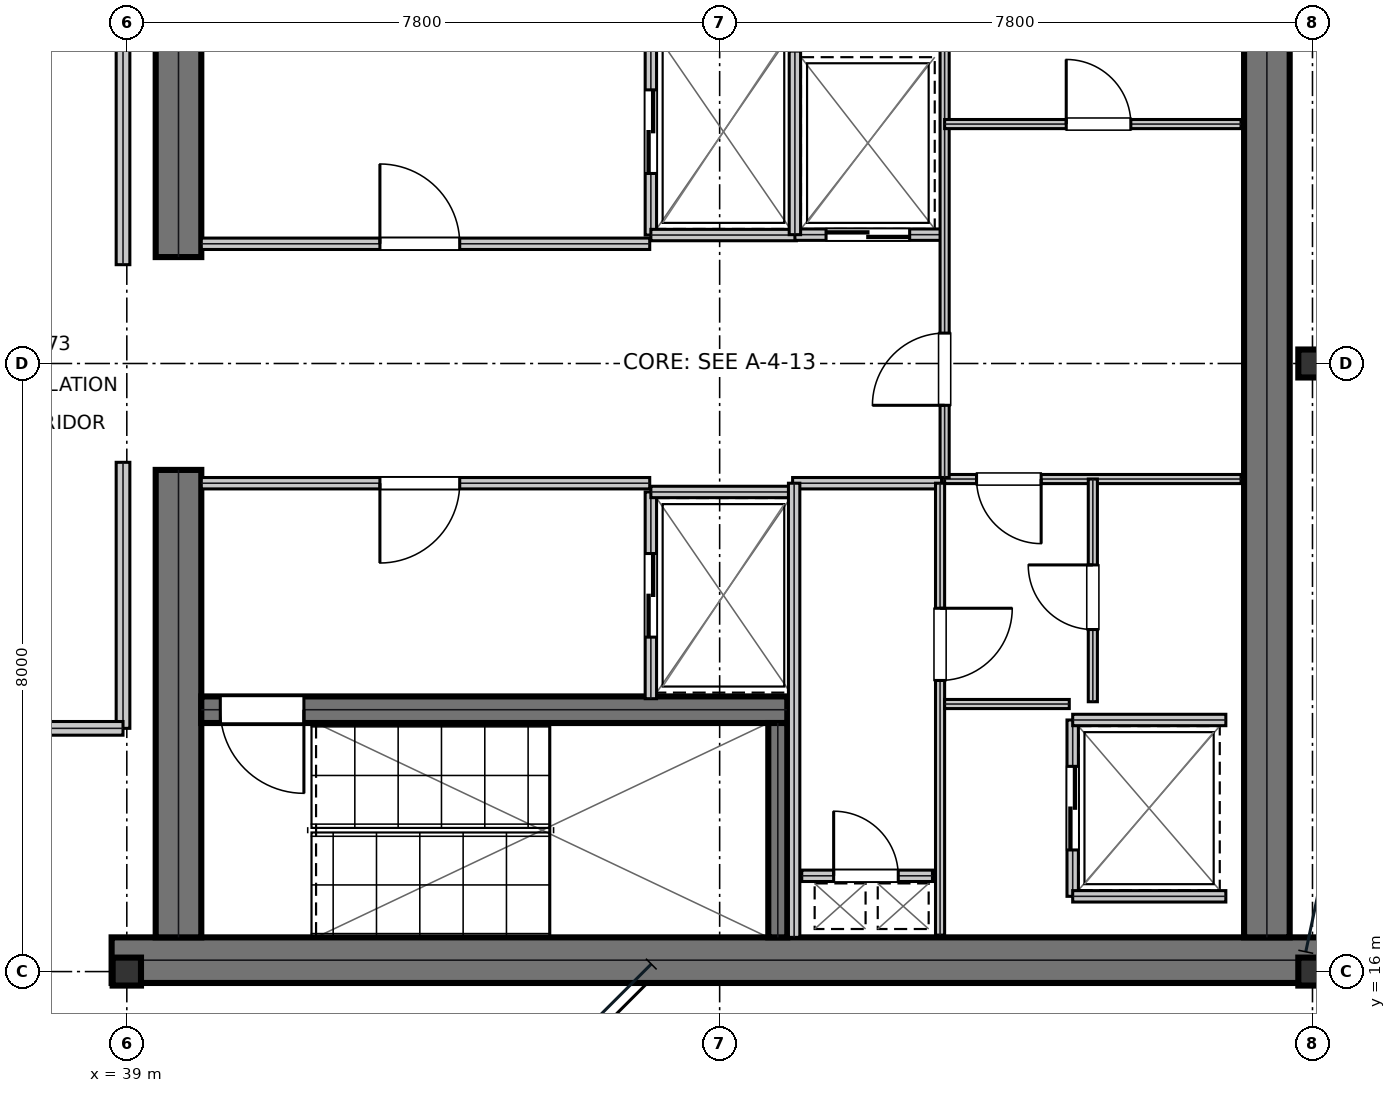
"""IFC4 building model, lengths in metres.
Left out: names, types, materials, properties, quantities, classifications, styles, units other than length and angle.
Written with IfcOpenShell. Run it as: python <this file> out.ifc"""

import sys

from ifc_helpers import new_model, si_unit, direction, frame, frame_2d, origin, origin_2d, place, context, subcontext, project, spatial, rectangle, i_section, extrude, element, fill, save


model = new_model("IFC4")
c1 = context("Model", 3, precision=1e-05, world=origin(), true_north=direction((0.0, 1.0)))
c2 = subcontext(c1, "Body", "Model", "MODEL_VIEW")
j1 = project(units=[si_unit("LENGTHUNIT", "METRE"), si_unit("PLANEANGLEUNIT", "RADIAN")], contexts=[c1])
p1 = place(None, origin())
s1 = spatial("IfcSite", under=j1, at=p1, CompositionType="ELEMENT")
p2 = place(p1, origin())
s2 = spatial("IfcBuilding", under=s1, at=p2, CompositionType="ELEMENT")
p3 = place(p2, frame((0.0, 0.0, 311.4)))
s3 = spatial("IfcBuildingStorey", under=s2, at=p3, CompositionType="ELEMENT", Elevation=311.4)
p4 = place(p3, frame((38.8, 16.15, 0.0), z_axis=(0.0, 0.0, 1.0), x_axis=(1.0, 0.0, 0.0)))
e1 = element("IfcWall", 1, at=p4, inside=s3, PredefinedType="SHEAR", context=c2, shape_type="SweptSolid", body=[
    extrude(rectangle(XDim=16.0, YDim=0.6, at=frame_2d((8.0, 0.0))), origin(), (0.0, 0.0, 1.0), 3.78),
])
for number, where, z_axis, x_axis in (
    (2, (39.68, 16.45, 0.0), (0.0, 0.0, 1.0), (0.0, 1.0, 0.0)),
    (3, (39.68, 25.4, 0.0), (0.0, 0.0, 1.0), (0.0, 1.0, 0.0)),
):
    element("IfcWall", number, at=place(p3, frame(where, z_axis=z_axis, x_axis=x_axis)), inside=s3, PredefinedType="SHEAR", context=c2, shape_type="SweptSolid", body=[
        extrude(rectangle(XDim=6.15, YDim=0.6, at=frame_2d((3.075, 0.0))), origin(), (0.0, 0.0, 1.0), 3.78),
    ])
p5 = place(p3, frame((54.0, 16.45, 0.0), z_axis=(0.0, 0.0, 1.0), x_axis=(0.0, 1.0, 0.0)))
e4 = element("IfcWall", 4, at=p5, inside=s3, PredefinedType="SHEAR", context=c2, shape_type="SweptSolid", body=[
    extrude(rectangle(XDim=15.1, YDim=0.6, at=frame_2d((7.55, 0.0))), origin(), (0.0, 0.0, 1.0), 3.78),
])
p6 = place(p3, frame((39.98, 19.445, 0.0), z_axis=(0.0, 0.0, 1.0), x_axis=(1.0, 0.0, 0.0)))
e5 = element("IfcWall", 5, at=p6, inside=s3, PredefinedType="SHEAR", context=c2, shape_type="SweptSolid", body=[
    extrude(rectangle(XDim=7.71, YDim=0.35, at=frame_2d((3.855, 0.0))), origin(), (0.0, 0.0, 1.0), 3.78),
])
p7 = place(p6, frame((0.25, 0.0, 0.0)))
e6 = element("IfcOpeningElement", 6, at=p7, cuts=e5, PredefinedType="OPENING", context=c2, shape_type="SweptSolid", body=[
    extrude(rectangle(XDim=1.1, YDim=2.15, at=frame_2d((0.55, 1.075))), frame((0.0, 0.185, 0.0), z_axis=(0.0, -1.0, 0.0), x_axis=(1.0, 0.0, 0.0)), (0.0, 0.0, 1.0), 0.37),
])
p8 = place(p3, frame((47.565, 16.45, 0.0), z_axis=(0.0, 0.0, 1.0), x_axis=(0.0, 1.0, 0.0)))
e7 = element("IfcWall", 7, at=p8, inside=s3, PredefinedType="SHEAR", context=c2, shape_type="SweptSolid", body=[
    extrude(rectangle(XDim=2.82, YDim=0.25, at=frame_2d((1.41, 0.0))), origin(), (0.0, 0.0, 1.0), 3.78),
])
for number, where, z_axis, x_axis in (
    (8, (39.0, 16.0, 0.0), (0.0, 0.0, 1.0), (1.0, 0.0, 0.0)),
    (9, (54.6, 16.0, 0.0), (0.0, 0.0, 1.0), (1.0, 0.0, 0.0)),
    (10, (54.6, 24.0, 0.0), (0.0, 0.0, 1.0), (1.0, 0.0, 0.0)),
):
    element("IfcColumn", number, at=place(p3, frame(where, z_axis=z_axis, x_axis=x_axis)), inside=s3, PredefinedType="COLUMN", context=c2, shape_type="SweptSolid", body=[
        extrude(i_section(OverallWidth=0.373, OverallDepth=0.368, WebThickness=0.015, FlangeThickness=0.024, at=origin_2d()), origin(), (0.0, 0.0, 1.0), 4.044),
    ])
p9 = place(p3, frame((39.98, 25.575, 0.0), z_axis=(0.0, 0.0, 1.0), x_axis=(1.0, 0.0, 0.0)))
e11 = element("IfcWall", 11, at=p9, inside=s3, PredefinedType="PARTITIONING", context=c2, shape_type="SweptSolid", body=[
    extrude(rectangle(XDim=5.9, YDim=0.15, at=frame_2d((2.95, 0.0))), origin(), (0.0, 0.0, 1.0), 3.78),
])
p10 = place(p9, frame((2.35, 0.0, 0.0)))
e12 = element("IfcOpeningElement", 12, at=p10, cuts=e11, PredefinedType="OPENING", context=c2, shape_type="SweptSolid", body=[
    extrude(rectangle(XDim=1.05, YDim=2.15, at=frame_2d((0.525, 1.075))), frame((0.0, 0.085, 0.0), z_axis=(0.0, -1.0, 0.0), x_axis=(1.0, 0.0, 0.0)), (0.0, 0.0, 1.0), 0.17),
])
p11 = place(p3, frame((39.98, 22.425, 0.0), z_axis=(0.0, 0.0, 1.0), x_axis=(1.0, 0.0, 0.0)))
e13 = element("IfcWall", 13, at=p11, inside=s3, PredefinedType="PARTITIONING", context=c2, shape_type="SweptSolid", body=[
    extrude(rectangle(XDim=5.9, YDim=0.15, at=frame_2d((2.95, 0.0))), origin(), (0.0, 0.0, 1.0), 3.78),
])
p12 = place(p11, frame((2.35, 0.0, 0.0)))
e14 = element("IfcOpeningElement", 14, at=p12, cuts=e13, PredefinedType="OPENING", context=c2, shape_type="SweptSolid", body=[
    extrude(rectangle(XDim=1.05, YDim=2.15, at=frame_2d((0.525, 1.075))), frame((0.0, 0.085, 0.0), z_axis=(0.0, -1.0, 0.0), x_axis=(1.0, 0.0, 0.0)), (0.0, 0.0, 1.0), 0.17),
])
p13 = place(p3, frame((45.895, 25.69, 0.0), z_axis=(0.0, 0.0, 1.0), x_axis=(0.0, 1.0, 0.0)))
e15 = element("IfcWall", 15, at=p13, inside=s3, PredefinedType="PARTITIONING", context=c2, shape_type="SweptSolid", body=[
    extrude(rectangle(XDim=2.72, YDim=0.15, at=frame_2d((1.36, 0.0))), origin(), (0.0, 0.0, 1.0), 3.78),
])
p14 = place(p13, frame((0.81, 0.0, 0.0)))
e16 = element("IfcOpeningElement", 16, at=p14, cuts=e15, PredefinedType="OPENING", context=c2, shape_type="SweptSolid", body=[
    extrude(rectangle(XDim=1.1, YDim=2.15, at=frame_2d((0.55, 1.075))), frame((0.0, 0.085, 0.0), z_axis=(0.0, -1.0, 0.0), x_axis=(1.0, 0.0, 0.0)), (0.0, 0.0, 1.0), 0.17),
])
p15 = place(p3, frame((45.895, 25.69, 0.0), z_axis=(0.0, 0.0, 1.0), x_axis=(1.0, 0.0, 0.0)))
e17 = element("IfcWall", 17, at=p15, inside=s3, PredefinedType="PARTITIONING", context=c2, shape_type="SweptSolid", body=[
    extrude(rectangle(XDim=1.915, YDim=0.15, at=frame_2d((0.958, 0.0))), origin(), (0.0, 0.0, 1.0), 3.78),
])
p16 = place(p3, frame((45.895, 19.59, 0.0), z_axis=(0.0, 0.0, 1.0), x_axis=(0.0, 1.0, 0.0)))
e18 = element("IfcWall", 18, at=p16, inside=s3, PredefinedType="PARTITIONING", context=c2, shape_type="SweptSolid", body=[
    extrude(rectangle(XDim=2.72, YDim=0.15, at=frame_2d((1.36, 0.0))), origin(), (0.0, 0.0, 1.0), 3.78),
])
p17 = place(p16, frame((0.81, 0.0, 0.0)))
e19 = element("IfcOpeningElement", 19, at=p17, cuts=e18, PredefinedType="OPENING", context=c2, shape_type="SweptSolid", body=[
    extrude(rectangle(XDim=1.1, YDim=2.15, at=frame_2d((0.55, 1.075))), frame((0.0, 0.085, 0.0), z_axis=(0.0, -1.0, 0.0), x_axis=(1.0, 0.0, 0.0)), (0.0, 0.0, 1.0), 0.17),
])
p18 = place(p3, frame((45.895, 22.31, 0.0), z_axis=(0.0, 0.0, 1.0), x_axis=(1.0, 0.0, 0.0)))
e20 = element("IfcWall", 20, at=p18, inside=s3, PredefinedType="PARTITIONING", context=c2, shape_type="SweptSolid", body=[
    extrude(rectangle(XDim=1.915, YDim=0.15, at=frame_2d((0.958, 0.0))), origin(), (0.0, 0.0, 1.0), 3.78),
])
p19 = place(p3, frame((47.79, 25.695, 0.0), z_axis=(0.0, 0.0, 1.0), x_axis=(1.0, 0.0, 0.0)))
e21 = element("IfcWall", 21, at=p19, inside=s3, PredefinedType="PARTITIONING", context=c2, shape_type="SweptSolid", body=[
    extrude(rectangle(XDim=1.92, YDim=0.15, at=frame_2d((0.96, 0.0))), origin(), (0.0, 0.0, 1.0), 3.78),
])
p20 = place(p19, frame((0.41, 0.0, 0.0)))
e22 = element("IfcOpeningElement", 22, at=p20, cuts=e21, PredefinedType="OPENING", context=c2, shape_type="SweptSolid", body=[
    extrude(rectangle(XDim=1.1, YDim=2.15, at=frame_2d((0.55, 1.075))), frame((0.0, 0.085, 0.0), z_axis=(0.0, -1.0, 0.0), x_axis=(1.0, 0.0, 0.0)), (0.0, 0.0, 1.0), 0.17),
])
p21 = place(p3, frame((47.79, 25.695, 0.0), z_axis=(0.0, 0.0, 1.0), x_axis=(0.0, 1.0, 0.0)))
e23 = element("IfcWall", 23, at=p21, inside=s3, PredefinedType="PARTITIONING", context=c2, shape_type="SweptSolid", body=[
    extrude(rectangle(XDim=2.415, YDim=0.15, at=frame_2d((1.208, 0.0))), origin(), (0.0, 0.0, 1.0), 3.78),
])
p22 = place(p3, frame((51.445, 16.99, 0.0), z_axis=(0.0, 0.0, 1.0), x_axis=(0.0, 1.0, 0.0)))
e24 = element("IfcWall", 24, at=p22, inside=s3, PredefinedType="PARTITIONING", context=c2, shape_type="SweptSolid", body=[
    extrude(rectangle(XDim=2.32, YDim=0.15, at=frame_2d((1.16, 0.0))), origin(), (0.0, 0.0, 1.0), 3.78),
])
p23 = place(p22, frame((0.61, 0.0, 0.0)))
e25 = element("IfcOpeningElement", 25, at=p23, cuts=e24, PredefinedType="OPENING", context=c2, shape_type="SweptSolid", body=[
    extrude(rectangle(XDim=1.1, YDim=2.15, at=frame_2d((0.55, 1.075))), frame((0.0, 0.085, 0.0), z_axis=(0.0, -1.0, 0.0), x_axis=(1.0, 0.0, 0.0)), (0.0, 0.0, 1.0), 0.17),
])
for number, where, z_axis, x_axis in (
    (26, (51.445, 16.99, 0.0), (0.0, 0.0, 1.0), (1.0, 0.0, 0.0)),
    (27, (51.445, 19.31, 0.0), (0.0, 0.0, 1.0), (1.0, 0.0, 0.0)),
):
    element("IfcWall", number, at=place(p3, frame(where, z_axis=z_axis, x_axis=x_axis)), inside=s3, PredefinedType="PARTITIONING", context=c2, shape_type="SweptSolid", body=[
        extrude(rectangle(XDim=2.015, YDim=0.15, at=frame_2d((1.007, 0.0))), origin(), (0.0, 0.0, 1.0), 3.78),
    ])
p24 = place(p3, frame((47.88, 17.26, 0.0), z_axis=(0.0, 0.0, 1.0), x_axis=(1.0, 0.0, 0.0)))
e28 = element("IfcWall", 28, at=p24, inside=s3, PredefinedType="PARTITIONING", context=c2, shape_type="SweptSolid", body=[
    extrude(rectangle(XDim=1.72, YDim=0.15, at=frame_2d((0.86, 0.0))), origin(), (0.0, 0.0, 1.0), 3.78),
])
p25 = place(p24, frame((0.42, 0.0, 0.0)))
e29 = element("IfcOpeningElement", 29, at=p25, cuts=e28, PredefinedType="OPENING", context=c2, shape_type="SweptSolid", body=[
    extrude(rectangle(XDim=0.85, YDim=2.15, at=frame_2d((0.425, 1.075))), frame((0.0, 0.085, 0.0), z_axis=(0.0, -1.0, 0.0), x_axis=(1.0, 0.0, 0.0)), (0.0, 0.0, 1.0), 0.17),
])
p26 = place(p3, frame((47.76, 22.425, 0.0), z_axis=(0.0, 0.0, 1.0), x_axis=(1.0, 0.0, 0.0)))
e30 = element("IfcWall", 30, at=p26, inside=s3, PredefinedType="PARTITIONING", context=c2, shape_type="SweptSolid", body=[
    extrude(rectangle(XDim=1.96, YDim=0.15, at=frame_2d((0.98, 0.0))), origin(), (0.0, 0.0, 1.0), 3.78),
])
p27 = place(p3, frame((47.78, 16.45, 0.0), z_axis=(0.0, 0.0, 1.0), x_axis=(0.0, 1.0, 0.0)))
e31 = element("IfcWall", 31, at=p27, inside=s3, PredefinedType="PARTITIONING", context=c2, shape_type="SweptSolid", body=[
    extrude(rectangle(XDim=5.975, YDim=0.15, at=frame_2d((2.988, 0.0))), origin(), (0.0, 0.0, 1.0), 3.78),
])
p28 = place(p3, frame((49.7, 16.48, 0.0), z_axis=(0.0, 0.0, 1.0), x_axis=(0.0, 1.0, 0.0)))
e32 = element("IfcWall", 32, at=p28, inside=s3, PredefinedType="PARTITIONING", context=c2, shape_type="SweptSolid", body=[
    extrude(rectangle(XDim=5.945, YDim=0.12, at=frame_2d((2.973, 0.0))), origin(), (0.0, 0.0, 1.0), 3.78),
])
p29 = place(p28, frame((3.35, 0.0, 0.0)))
e33 = element("IfcOpeningElement", 33, at=p29, cuts=e32, PredefinedType="OPENING", context=c2, shape_type="SweptSolid", body=[
    extrude(rectangle(XDim=0.95, YDim=2.15, at=frame_2d((0.475, 1.075))), frame((0.0, 0.07, 0.0), z_axis=(0.0, -1.0, 0.0), x_axis=(1.0, 0.0, 0.0)), (0.0, 0.0, 1.0), 0.14),
])
p30 = place(p3, frame((49.76, 22.48, 0.0), z_axis=(0.0, 0.0, 1.0), x_axis=(1.0, 0.0, 0.0)))
e34 = element("IfcWall", 34, at=p30, inside=s3, PredefinedType="PARTITIONING", context=c2, shape_type="SweptSolid", body=[
    extrude(rectangle(XDim=3.9, YDim=0.12, at=frame_2d((1.95, 0.0))), origin(), (0.0, 0.0, 1.0), 3.78),
])
p31 = place(p30, frame((0.42, 0.0, 0.0)))
e35 = element("IfcOpeningElement", 35, at=p31, cuts=e34, PredefinedType="OPENING", context=c2, shape_type="SweptSolid", body=[
    extrude(rectangle(XDim=0.85, YDim=2.15, at=frame_2d((0.425, 1.075))), frame((0.0, 0.07, 0.0), z_axis=(0.0, -1.0, 0.0), x_axis=(1.0, 0.0, 0.0)), (0.0, 0.0, 1.0), 0.14),
])
p32 = place(p3, frame((51.71, 19.55, 0.0), z_axis=(0.0, 0.0, 1.0), x_axis=(0.0, 1.0, 0.0)))
e36 = element("IfcWall", 36, at=p32, inside=s3, PredefinedType="PARTITIONING", context=c2, shape_type="SweptSolid", body=[
    extrude(rectangle(XDim=2.93, YDim=0.12, at=frame_2d((1.465, 0.0))), origin(), (0.0, 0.0, 1.0), 3.78),
])
p33 = place(p32, frame((0.95, 0.0, 0.0)))
e37 = element("IfcOpeningElement", 37, at=p33, cuts=e36, PredefinedType="OPENING", context=c2, shape_type="SweptSolid", body=[
    extrude(rectangle(XDim=0.85, YDim=2.15, at=frame_2d((0.425, 1.075))), frame((0.0, 0.07, 0.0), z_axis=(0.0, -1.0, 0.0), x_axis=(1.0, 0.0, 0.0)), (0.0, 0.0, 1.0), 0.14),
])
p34 = place(p3, frame((49.76, 19.52, 0.0), z_axis=(0.0, 0.0, 1.0), x_axis=(1.0, 0.0, 0.0)))
e38 = element("IfcWall", 38, at=p34, inside=s3, PredefinedType="PARTITIONING", context=c2, shape_type="SweptSolid", body=[
    extrude(rectangle(XDim=1.64, YDim=0.12, at=frame_2d((0.82, 0.0))), origin(), (0.0, 0.0, 1.0), 3.78),
])
p35 = place(p3, frame((49.76, 22.5, 0.0), z_axis=(0.0, 0.0, 1.0), x_axis=(0.0, 1.0, 0.0)))
e39 = element("IfcWall", 39, at=p35, inside=s3, PredefinedType="PARTITIONING", context=c2, shape_type="SweptSolid", body=[
    extrude(rectangle(XDim=5.72, YDim=0.12, at=frame_2d((2.86, 0.0))), origin(), (0.0, 0.0, 1.0), 3.78),
])
p36 = place(p35, frame((0.95, 0.0, 0.0)))
e40 = element("IfcOpeningElement", 40, at=p36, cuts=e39, PredefinedType="OPENING", context=c2, shape_type="SweptSolid", body=[
    extrude(rectangle(XDim=0.95, YDim=2.15, at=frame_2d((0.475, 1.075))), frame((0.0, 0.07, 0.0), z_axis=(0.0, -1.0, 0.0), x_axis=(1.0, 0.0, 0.0)), (0.0, 0.0, 1.0), 0.14),
])
p37 = place(p3, frame((49.76, 27.15, 0.0), z_axis=(0.0, 0.0, 1.0), x_axis=(1.0, 0.0, 0.0)))
e41 = element("IfcWall", 41, at=p37, inside=s3, PredefinedType="PARTITIONING", context=c2, shape_type="SweptSolid", body=[
    extrude(rectangle(XDim=3.9, YDim=0.12, at=frame_2d((1.95, 0.0))), origin(), (0.0, 0.0, 1.0), 3.78),
])
p38 = place(p37, frame((1.6, 0.0, 0.0)))
e42 = element("IfcOpeningElement", 42, at=p38, cuts=e41, PredefinedType="OPENING", context=c2, shape_type="SweptSolid", body=[
    extrude(rectangle(XDim=0.85, YDim=2.15, at=frame_2d((0.425, 1.075))), frame((0.0, 0.07, 0.0), z_axis=(0.0, -1.0, 0.0), x_axis=(1.0, 0.0, 0.0)), (0.0, 0.0, 1.0), 0.14),
])
p39 = place(p3, frame((38.95, 19.2, 0.0), z_axis=(0.0, 0.0, 1.0), x_axis=(0.0, 1.0, 0.0)))
e43 = element("IfcWall", 43, at=p39, inside=s3, PredefinedType="SOLIDWALL", context=c2, shape_type="SweptSolid", body=[
    extrude(rectangle(XDim=3.5, YDim=0.18, at=frame_2d((1.75, 0.0))), origin(), (0.0, 0.0, 1.0), 3.51),
])
p40 = place(p3, frame((37.05, 19.2, 0.0), z_axis=(0.0, 0.0, 1.0), x_axis=(1.0, 0.0, 0.0)))
e44 = element("IfcWall", 44, at=p40, inside=s3, PredefinedType="SOLIDWALL", context=c2, shape_type="SweptSolid", body=[
    extrude(rectangle(XDim=1.9, YDim=0.18, at=frame_2d((0.95, 0.0))), origin(), (0.0, 0.0, 1.0), 3.78),
])
p41 = place(p3, frame((38.95, 25.3, 0.0), z_axis=(0.0, 0.0, 1.0), x_axis=(0.0, 1.0, 0.0)))
e45 = element("IfcWall", 45, at=p41, inside=s3, PredefinedType="SOLIDWALL", context=c2, shape_type="SweptSolid", body=[
    extrude(rectangle(XDim=3.5, YDim=0.18, at=frame_2d((1.75, 0.0))), origin(), (0.0, 0.0, 1.0), 3.51),
])
p42 = place(p10, origin())
e46 = element("IfcDoor", 46, at=p42, inside=s3, OperationType="SINGLE_SWING_LEFT", PredefinedType="DOOR", context=c2, shape_type="SweptSolid", body=[
    extrude(rectangle(XDim=1.05, YDim=2.15, at=frame_2d((0.525, 1.075))), frame((0.0, 0.025, 0.0), z_axis=(0.0, -1.0, 0.0), x_axis=(1.0, 0.0, 0.0)), (0.0, 0.0, 1.0), 0.05),
])
fill(e12, e46)
p43 = place(p12, frame((1.05, 0.0, 0.0), z_axis=(0.0, 0.0, 1.0), x_axis=(-1.0, 0.0, 0.0)))
e47 = element("IfcDoor", 47, at=p43, inside=s3, OperationType="SINGLE_SWING_RIGHT", PredefinedType="DOOR", context=c2, shape_type="SweptSolid", body=[
    extrude(rectangle(XDim=1.05, YDim=2.15, at=frame_2d((0.525, 1.075))), frame((0.0, 0.025, 0.0), z_axis=(0.0, -1.0, 0.0), x_axis=(1.0, 0.0, 0.0)), (0.0, 0.0, 1.0), 0.05),
])
fill(e14, e47)
p44 = place(p14, frame((1.1, 0.0, 0.0), z_axis=(0.0, 0.0, 1.0), x_axis=(-1.0, 0.0, 0.0)))
e48 = element("IfcDoor", 48, at=p44, inside=s3, OperationType="DOUBLE_DOOR_SLIDING", PredefinedType="DOOR", context=c2, shape_type="SweptSolid", body=[
    extrude(rectangle(XDim=1.1, YDim=2.15, at=frame_2d((0.55, 1.075))), frame((0.0, 0.025, 0.0), z_axis=(0.0, -1.0, 0.0), x_axis=(1.0, 0.0, 0.0)), (0.0, 0.0, 1.0), 0.05),
])
fill(e16, e48)
p45 = place(p17, frame((1.1, 0.0, 0.0), z_axis=(0.0, 0.0, 1.0), x_axis=(-1.0, 0.0, 0.0)))
e49 = element("IfcDoor", 49, at=p45, inside=s3, OperationType="DOUBLE_DOOR_SLIDING", PredefinedType="DOOR", context=c2, shape_type="SweptSolid", body=[
    extrude(rectangle(XDim=1.1, YDim=2.15, at=frame_2d((0.55, 1.075))), frame((0.0, 0.025, 0.0), z_axis=(0.0, -1.0, 0.0), x_axis=(1.0, 0.0, 0.0)), (0.0, 0.0, 1.0), 0.05),
])
fill(e19, e49)
p46 = place(p20, frame((1.1, 0.0, 0.0), z_axis=(0.0, 0.0, 1.0), x_axis=(-1.0, 0.0, 0.0)))
e50 = element("IfcDoor", 50, at=p46, inside=s3, OperationType="DOUBLE_DOOR_SLIDING", PredefinedType="DOOR", context=c2, shape_type="SweptSolid", body=[
    extrude(rectangle(XDim=1.1, YDim=2.15, at=frame_2d((0.55, 1.075))), frame((0.0, 0.025, 0.0), z_axis=(0.0, -1.0, 0.0), x_axis=(1.0, 0.0, 0.0)), (0.0, 0.0, 1.0), 0.05),
])
fill(e22, e50)
p47 = place(p23, frame((1.1, 0.0, 0.0), z_axis=(0.0, 0.0, 1.0), x_axis=(-1.0, 0.0, 0.0)))
e51 = element("IfcDoor", 51, at=p47, inside=s3, OperationType="DOUBLE_DOOR_SLIDING", PredefinedType="DOOR", context=c2, shape_type="SweptSolid", body=[
    extrude(rectangle(XDim=1.1, YDim=2.15, at=frame_2d((0.55, 1.075))), frame((0.0, 0.025, 0.0), z_axis=(0.0, -1.0, 0.0), x_axis=(1.0, 0.0, 0.0)), (0.0, 0.0, 1.0), 0.05),
])
fill(e25, e51)
p48 = place(p25, origin())
e52 = element("IfcDoor", 52, at=p48, inside=s3, OperationType="SINGLE_SWING_LEFT", PredefinedType="TRAPDOOR", context=c2, shape_type="SweptSolid", body=[
    extrude(rectangle(XDim=0.85, YDim=2.15, at=frame_2d((0.425, 1.075))), frame((0.0, 0.025, 0.0), z_axis=(0.0, -1.0, 0.0), x_axis=(1.0, 0.0, 0.0)), (0.0, 0.0, 1.0), 0.05),
])
fill(e29, e52)
p49 = place(p29, frame((0.95, 0.0, 0.0), z_axis=(0.0, 0.0, 1.0), x_axis=(-1.0, 0.0, 0.0)))
e53 = element("IfcDoor", 53, at=p49, inside=s3, OperationType="SINGLE_SWING_LEFT", PredefinedType="DOOR", context=c2, shape_type="SweptSolid", body=[
    extrude(rectangle(XDim=0.95, YDim=2.15, at=frame_2d((0.475, 1.075))), frame((0.0, 0.025, 0.0), z_axis=(0.0, -1.0, 0.0), x_axis=(1.0, 0.0, 0.0)), (0.0, 0.0, 1.0), 0.05),
])
fill(e33, e53)
p50 = place(p31, frame((0.85, 0.0, 0.0), z_axis=(0.0, 0.0, 1.0), x_axis=(-1.0, 0.0, 0.0)))
e54 = element("IfcDoor", 54, at=p50, inside=s3, OperationType="SINGLE_SWING_LEFT", PredefinedType="DOOR", context=c2, shape_type="SweptSolid", body=[
    extrude(rectangle(XDim=0.85, YDim=2.15, at=frame_2d((0.425, 1.075))), frame((0.0, 0.025, 0.0), z_axis=(0.0, -1.0, 0.0), x_axis=(1.0, 0.0, 0.0)), (0.0, 0.0, 1.0), 0.05),
])
fill(e35, e54)
p51 = place(p33, origin())
e55 = element("IfcDoor", 55, at=p51, inside=s3, OperationType="SINGLE_SWING_RIGHT", PredefinedType="DOOR", context=c2, shape_type="SweptSolid", body=[
    extrude(rectangle(XDim=0.85, YDim=2.15, at=frame_2d((0.425, 1.075))), frame((0.0, 0.025, 0.0), z_axis=(0.0, -1.0, 0.0), x_axis=(1.0, 0.0, 0.0)), (0.0, 0.0, 1.0), 0.05),
])
fill(e37, e55)
p52 = place(p36, origin())
e56 = element("IfcDoor", 56, at=p52, inside=s3, OperationType="SINGLE_SWING_LEFT", PredefinedType="DOOR", context=c2, shape_type="SweptSolid", body=[
    extrude(rectangle(XDim=0.95, YDim=2.15, at=frame_2d((0.475, 1.075))), frame((0.0, 0.025, 0.0), z_axis=(0.0, -1.0, 0.0), x_axis=(1.0, 0.0, 0.0)), (0.0, 0.0, 1.0), 0.05),
])
fill(e40, e56)
p53 = place(p38, origin())
e57 = element("IfcDoor", 57, at=p53, inside=s3, OperationType="SINGLE_SWING_LEFT", PredefinedType="DOOR", context=c2, shape_type="SweptSolid", body=[
    extrude(rectangle(XDim=0.85, YDim=2.15, at=frame_2d((0.425, 1.075))), frame((0.0, 0.025, 0.0), z_axis=(0.0, -1.0, 0.0), x_axis=(1.0, 0.0, 0.0)), (0.0, 0.0, 1.0), 0.05),
])
fill(e42, e57)
p54 = place(p7, frame((1.1, 0.0, 0.0), z_axis=(0.0, 0.0, 1.0), x_axis=(-1.0, 0.0, 0.0)))
e58 = element("IfcDoor", 58, at=p54, inside=s3, OperationType="SINGLE_SWING_LEFT", PredefinedType="DOOR", context=c2, shape_type="SweptSolid", body=[
    extrude(rectangle(XDim=1.1, YDim=2.15, at=frame_2d((0.55, 1.075))), frame((0.0, 0.025, 0.0), z_axis=(0.0, -1.0, 0.0), x_axis=(1.0, 0.0, 0.0)), (0.0, 0.0, 1.0), 0.05),
])
fill(e6, e58)
save(model, sys.argv[1])
